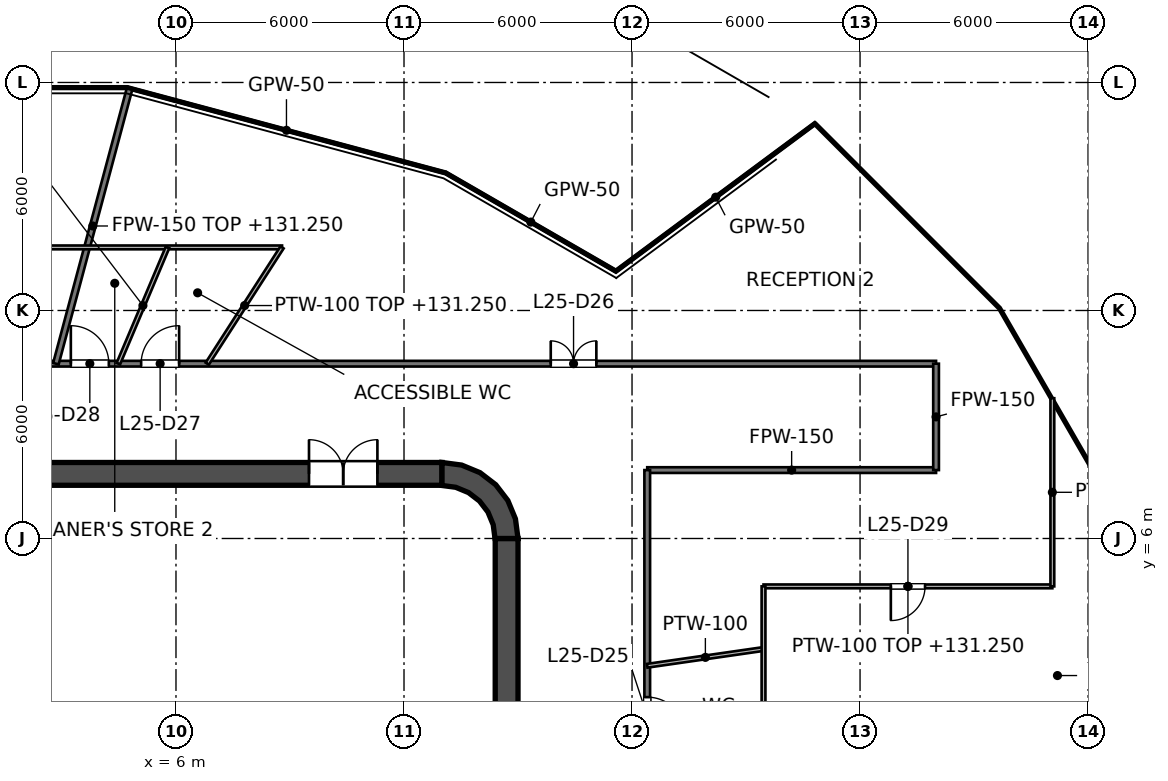
"""IFC4 building model, lengths in metres.
Left out: names, types, materials, properties, quantities, classifications, styles, units other than length and angle.
Written with IfcOpenShell. Run it as: python <this file> out.ifc"""

import sys

from ifc_helpers import new_model, si_unit, direction, frame, frame_2d, origin, place, context, subcontext, project, spatial, polyline, rectangle, outline, extrude, element, fill, save


model = new_model("IFC4")
c1 = context("Model", 3, precision=1e-05, world=origin(), true_north=direction((0.0, 1.0)))
c2 = subcontext(c1, "Body", "Model", "MODEL_VIEW")
j1 = project(units=[si_unit("LENGTHUNIT", "METRE"), si_unit("PLANEANGLEUNIT", "RADIAN")], contexts=[c1])
p1 = place(None, origin())
s1 = spatial("IfcSite", under=j1, at=p1, CompositionType="ELEMENT")
p2 = place(p1, origin())
s2 = spatial("IfcBuilding", under=s1, at=p2, CompositionType="ELEMENT")
p3 = place(p2, frame((0.0, 0.0, 127.2)))
s3 = spatial("IfcBuildingStorey", under=s2, at=p3, CompositionType="ELEMENT", Elevation=127.2)
p4 = place(p3, frame((-13.0, 7.7, 0.0), z_axis=(0.0, 0.0, 1.0), x_axis=(1.0, 0.0, 0.0)))
e1 = element("IfcWall", 1, at=p4, inside=s3, PredefinedType="SHEAR", context=c2, shape_type="SweptSolid", body=[
    extrude(rectangle(XDim=26.0, YDim=0.6, at=frame_2d((13.0, 0.0))), origin(), (0.0, 0.0, 1.0), 4.2),
])
p5 = place(p4, frame((1.7, 0.0, 0.0)))
e2 = element("IfcOpeningElement", 2, at=p5, cuts=e1, PredefinedType="OPENING", context=c2, shape_type="SweptSolid", body=[
    extrude(rectangle(XDim=1.8, YDim=2.1, at=frame_2d((0.9, 1.05))), frame((0.0, 0.3, 0.0), z_axis=(0.0, -1.0, 0.0), x_axis=(1.0, 0.0, 0.0)), (0.0, 0.0, 1.0), 0.6),
])
p6 = place(p4, frame((22.5, 0.0, 0.0)))
e3 = element("IfcOpeningElement", 3, at=p6, cuts=e1, PredefinedType="OPENING", context=c2, shape_type="SweptSolid", body=[
    extrude(rectangle(XDim=1.8, YDim=2.1, at=frame_2d((0.9, 1.05))), frame((0.0, 0.3, 0.0), z_axis=(0.0, -1.0, 0.0), x_axis=(1.0, 0.0, 0.0)), (0.0, 0.0, 1.0), 0.6),
])
p7 = place(p3, frame((14.7, -6.0, 0.0), z_axis=(0.0, 0.0, 1.0), x_axis=(0.0, 1.0, 0.0)))
e4 = element("IfcWall", 4, at=p7, inside=s3, PredefinedType="SHEAR", context=c2, shape_type="SweptSolid", body=[
    extrude(rectangle(XDim=12.0, YDim=0.6, at=frame_2d((6.0, 0.0))), origin(), (0.0, 0.0, 1.0), 4.2),
])
p8 = place(p3, origin())
e5 = element("IfcWall", 5, at=p8, inside=s3, PredefinedType="SHEAR", context=c2, shape_type="SweptSolid", body=[
    extrude(outline(polyline([(13.0, 8.0), (13.0, 7.395), (13.361, 7.347), (13.698, 7.208), (13.986, 6.986), (14.208, 6.698), (14.347, 6.361), (14.395, 6.0), (15.0, 6.0), (14.932, 6.518), (14.732, 7.0), (14.414, 7.414), (14.0, 7.732), (13.518, 7.932), (13.0, 8.0)])), origin(), (0.0, 0.0, 1.0), 4.2),
])
p9 = place(p3, frame((9.0, 4.1, 0.0), z_axis=(0.0, 0.0, 1.0), x_axis=(0.0, 1.0, 0.0)))
e6 = element("IfcWall", 6, at=p9, inside=s3, PredefinedType="SOLIDWALL", context=c2, shape_type="SweptSolid", body=[
    extrude(rectangle(XDim=2.5, YDim=0.25, at=frame_2d((1.25, 0.0))), origin(), (0.0, 0.0, 1.0), 4.05),
])
p10 = place(p9, frame((0.65, 0.0, 0.0)))
e7 = element("IfcOpeningElement", 7, at=p10, cuts=e6, PredefinedType="OPENING", context=c2, shape_type="SweptSolid", body=[
    extrude(rectangle(XDim=1.2, YDim=2.1, at=frame_2d((0.6, 1.05))), frame((0.0, 0.125, 0.0), z_axis=(0.0, -1.0, 0.0), x_axis=(1.0, 0.0, 0.0)), (0.0, 0.0, 1.0), 0.25),
])
p11 = place(p3, frame((3.15, 4.1, 0.0), z_axis=(0.0, 0.0, 1.0), x_axis=(0.0, 1.0, 0.0)))
e8 = element("IfcWall", 8, at=p11, inside=s3, PredefinedType="SOLIDWALL", context=c2, shape_type="SweptSolid", body=[
    extrude(rectangle(XDim=2.5, YDim=0.25, at=frame_2d((1.25, 0.0))), origin(), (0.0, 0.0, 1.0), 4.05),
])
p12 = place(p3, frame((-9.125, 7.0, 0.0), z_axis=(0.0, 0.0, 1.0), x_axis=(1.0, 0.0, 0.0)))
e9 = element("IfcWall", 9, at=p12, inside=s3, PredefinedType="SOLIDWALL", context=c2, shape_type="SweptSolid", body=[
    extrude(rectangle(XDim=18.25, YDim=0.8, at=frame_2d((9.125, 0.0))), origin(), (0.0, 0.0, 1.0), 4.05),
])
p13 = place(p3, frame((0.775, 3.975, 0.0), z_axis=(0.0, 0.0, 1.0), x_axis=(1.0, 0.0, 0.0)))
e10 = element("IfcWall", 10, at=p13, inside=s3, PredefinedType="SOLIDWALL", context=c2, shape_type="SweptSolid", body=[
    extrude(rectangle(XDim=8.35, YDim=0.25, at=frame_2d((4.175, 0.0))), origin(), (0.0, 0.0, 1.0), 4.05),
])
p14 = place(p3, frame((9.0, 1.65, 0.0), z_axis=(0.0, 0.0, 1.0), x_axis=(0.0, 1.0, 0.0)))
e11 = element("IfcWall", 11, at=p14, inside=s3, PredefinedType="PARTITIONING", context=c2, shape_type="SweptSolid", body=[
    extrude(rectangle(XDim=2.2, YDim=0.25, at=frame_2d((1.1, 0.0))), origin(), (0.0, 0.0, 1.0), 4.05),
])
p15 = place(p3, frame((4.4, 1.65, 0.0), z_axis=(0.0, 0.0, 1.0), x_axis=(0.0, 1.0, 0.0)))
e12 = element("IfcWall", 12, at=p15, inside=s3, PredefinedType="PARTITIONING", context=c2, shape_type="SweptSolid", body=[
    extrude(rectangle(XDim=2.2, YDim=0.1, at=frame_2d((1.1, 0.0))), origin(), (0.0, 0.0, 1.0), 4.05),
])
p16 = place(p3, frame((11.8, -7.4, 0.0), z_axis=(0.0, 0.0, 1.0), x_axis=(0.0, 1.0, 0.0)))
e13 = element("IfcWall", 13, at=p16, inside=s3, PredefinedType="SOLIDWALL", context=c2, shape_type="SweptSolid", body=[
    extrude(rectangle(XDim=14.8, YDim=0.4, at=frame_2d((7.4, 0.0))), origin(), (0.0, 0.0, 1.0), 4.05),
])
p17 = place(p16, frame((11.2, 0.0, 0.0)))
e14 = element("IfcOpeningElement", 14, at=p17, cuts=e13, PredefinedType="OPENING", context=c2, shape_type="SweptSolid", body=[
    extrude(rectangle(XDim=1.1, YDim=2.1, at=frame_2d((0.55, 1.05))), frame((0.0, 0.2, 0.0), z_axis=(0.0, -1.0, 0.0), x_axis=(1.0, 0.0, 0.0)), (0.0, 0.0, 1.0), 0.4),
])
p18 = place(p16, frame((8.3, 0.0, 0.0)))
e15 = element("IfcOpeningElement", 15, at=p18, cuts=e13, PredefinedType="OPENING", context=c2, shape_type="SweptSolid", body=[
    extrude(rectangle(XDim=1.1, YDim=2.1, at=frame_2d((0.55, 1.05))), frame((0.0, 0.2, 0.0), z_axis=(0.0, -1.0, 0.0), x_axis=(1.0, 0.0, 0.0)), (0.0, 0.0, 1.0), 0.4),
])
p19 = place(p16, frame((5.4, 0.0, 0.0)))
e16 = element("IfcOpeningElement", 16, at=p19, cuts=e13, PredefinedType="OPENING", context=c2, shape_type="SweptSolid", body=[
    extrude(rectangle(XDim=1.1, YDim=2.1, at=frame_2d((0.55, 1.05))), frame((0.0, 0.2, 0.0), z_axis=(0.0, -1.0, 0.0), x_axis=(1.0, 0.0, 0.0)), (0.0, 0.0, 1.0), 0.4),
])
p20 = place(p16, frame((13.552, 0.0, 0.0)))
e17 = element("IfcOpeningElement", 17, at=p20, cuts=e13, PredefinedType="OPENING", context=c2, shape_type="SweptSolid", body=[
    extrude(rectangle(XDim=0.9, YDim=2.1, at=frame_2d((0.45, 1.05))), frame((0.0, 0.2, 0.0), z_axis=(0.0, -1.0, 0.0), x_axis=(1.0, 0.0, 0.0)), (0.0, 0.0, 1.0), 0.4),
])
p21 = place(p16, frame((0.347, 0.0, 0.0)))
e18 = element("IfcOpeningElement", 18, at=p21, cuts=e13, PredefinedType="OPENING", context=c2, shape_type="SweptSolid", body=[
    extrude(rectangle(XDim=0.9, YDim=2.1, at=frame_2d((0.45, 1.05))), frame((0.0, 0.2, 0.0), z_axis=(0.0, -1.0, 0.0), x_axis=(1.0, 0.0, 0.0)), (0.0, 0.0, 1.0), 0.4),
])
e19 = element("IfcWall", 19, at=p8, inside=s3, PredefinedType="SOLIDWALL", context=c2, shape_type="SweptSolid", body=[
    extrude(outline(polyline([(12.0, -5.675), (12.0, -5.925), (14.15, -5.925), (14.4, -5.925), (14.4, -5.675), (14.4, -3.025), (14.4, -2.775), (14.4, -0.125), (14.4, 0.125), (14.4, 2.775), (14.4, 3.025), (14.4, 5.675), (14.4, 5.925), (14.15, 5.925), (12.0, 5.925), (12.0, 5.675), (14.15, 5.675), (14.15, 3.025), (12.0, 3.025), (12.0, 2.775), (14.15, 2.775), (14.15, 0.125), (12.0, 0.125), (12.0, -0.125), (14.15, -0.125), (14.15, -2.775), (12.0, -2.775), (12.0, -3.025), (14.15, -3.025), (14.15, -5.675), (12.0, -5.675)])), origin(), (0.0, 0.0, 1.0), 4.05),
])
p22 = place(p3, frame((18.4, 7.8, 0.0), z_axis=(0.0, 0.0, 1.0), x_axis=(1.0, 0.0, 0.0)))
e20 = element("IfcWall", 20, at=p22, inside=s3, PredefinedType="PARTITIONING", context=c2, shape_type="SweptSolid", body=[
    extrude(rectangle(XDim=7.6, YDim=0.15, at=frame_2d((3.8, 0.0))), origin(), (0.0, 0.0, 1.0), 3.195),
])
p23 = place(p3, frame((-26.0, 10.6, 0.0), z_axis=(0.0, 0.0, 1.0), x_axis=(1.0, 0.0, 0.0)))
e21 = element("IfcWall", 21, at=p23, inside=s3, PredefinedType="PARTITIONING", context=c2, shape_type="SweptSolid", body=[
    extrude(rectangle(XDim=52.0, YDim=0.15, at=frame_2d((26.0, 0.0))), origin(), (0.0, 0.0, 1.0), 3.127),
])
p24 = place(p23, frame((41.861, 0.0, 0.0)))
e22 = element("IfcOpeningElement", 22, at=p24, cuts=e21, PredefinedType="OPENING", context=c2, shape_type="SweptSolid", body=[
    extrude(rectangle(XDim=1.2, YDim=2.1, at=frame_2d((0.6, 1.05))), frame((0.0, 0.075, 0.0), z_axis=(0.0, -1.0, 0.0), x_axis=(1.0, 0.0, 0.0)), (0.0, 0.0, 1.0), 0.15),
])
p25 = place(p23, frame((31.083, 0.0, 0.0)))
e23 = element("IfcOpeningElement", 23, at=p25, cuts=e21, PredefinedType="OPENING", context=c2, shape_type="SweptSolid", body=[
    extrude(rectangle(XDim=1.0, YDim=2.1, at=frame_2d((0.5, 1.05))), frame((0.0, 0.075, 0.0), z_axis=(0.0, -1.0, 0.0), x_axis=(1.0, 0.0, 0.0)), (0.0, 0.0, 1.0), 0.15),
])
p26 = place(p23, frame((29.233, 0.0, 0.0)))
e24 = element("IfcOpeningElement", 24, at=p26, cuts=e21, PredefinedType="OPENING", context=c2, shape_type="SweptSolid", body=[
    extrude(rectangle(XDim=1.0, YDim=2.1, at=frame_2d((0.5, 1.05))), frame((0.0, 0.075, 0.0), z_axis=(0.0, -1.0, 0.0), x_axis=(1.0, 0.0, 0.0)), (0.0, 0.0, 1.0), 0.15),
])
p27 = place(p23, frame((25.5, 0.0, 0.0)))
e25 = element("IfcOpeningElement", 25, at=p27, cuts=e21, PredefinedType="OPENING", context=c2, shape_type="SweptSolid", body=[
    extrude(rectangle(XDim=1.0, YDim=2.1, at=frame_2d((0.5, 1.05))), frame((0.0, 0.075, 0.0), z_axis=(0.0, -1.0, 0.0), x_axis=(1.0, 0.0, 0.0)), (0.0, 0.0, 1.0), 0.15),
])
p28 = place(p23, frame((14.83, 0.0, 0.0)))
e26 = element("IfcOpeningElement", 26, at=p28, cuts=e21, PredefinedType="OPENING", context=c2, shape_type="SweptSolid", body=[
    extrude(rectangle(XDim=1.0, YDim=2.1, at=frame_2d((0.5, 1.05))), frame((0.0, 0.075, 0.0), z_axis=(0.0, -1.0, 0.0), x_axis=(1.0, 0.0, 0.0)), (0.0, 0.0, 1.0), 0.15),
])
p29 = place(p23, frame((3.249, 0.0, 0.0)))
e27 = element("IfcOpeningElement", 27, at=p29, cuts=e21, PredefinedType="OPENING", context=c2, shape_type="SweptSolid", body=[
    extrude(rectangle(XDim=1.0, YDim=2.1, at=frame_2d((0.5, 1.05))), frame((0.0, 0.075, 0.0), z_axis=(0.0, -1.0, 0.0), x_axis=(1.0, 0.0, 0.0)), (0.0, 0.0, 1.0), 0.15),
])
p30 = place(p3, frame((2.84, 10.6, 0.0), z_axis=(0.0, 0.0, 1.0), x_axis=(0.258833136442, 0.965922050416, 0.0)))
e28 = element("IfcWall", 28, at=p30, inside=s3, PredefinedType="PARTITIONING", context=c2, shape_type="SweptSolid", body=[
    extrude(rectangle(XDim=7.502, YDim=0.15, at=frame_2d((3.751, 0.0))), origin(), (0.0, 0.0, 1.0), 4.05),
])
p31 = place(p3, frame((26.0, 7.8, 0.0), z_axis=(0.0, 0.0, 1.0), x_axis=(0.0, 1.0, 0.0)))
e29 = element("IfcWall", 29, at=p31, inside=s3, PredefinedType="PARTITIONING", context=c2, shape_type="SweptSolid", body=[
    extrude(rectangle(XDim=2.8, YDim=0.15, at=frame_2d((1.4, 0.0))), origin(), (0.0, 0.0, 1.0), 3.195),
])
p32 = place(p3, frame((18.4, -7.8, 0.0), z_axis=(0.0, 0.0, 1.0), x_axis=(0.0, 1.0, 0.0)))
e30 = element("IfcWall", 30, at=p32, inside=s3, PredefinedType="PARTITIONING", context=c2, shape_type="SweptSolid", body=[
    extrude(rectangle(XDim=15.6, YDim=0.15, at=frame_2d((7.8, 0.0))), origin(), (0.0, 0.0, 1.0), 3.127),
])
p33 = place(p32, frame((8.625, 0.0, 0.0)))
e31 = element("IfcOpeningElement", 31, at=p33, cuts=e30, PredefinedType="OPENING", context=c2, shape_type="SweptSolid", body=[
    extrude(rectangle(XDim=1.0, YDim=2.1, at=frame_2d((0.5, 1.05))), frame((0.0, 0.075, 0.0), z_axis=(0.0, -1.0, 0.0), x_axis=(1.0, 0.0, 0.0)), (0.0, 0.0, 1.0), 0.15),
])
p34 = place(p3, frame((13.098, 15.619, 0.0), z_axis=(0.0, 0.0, 1.0), x_axis=(0.866014140959, -0.500019507279, 0.0)))
e32 = element("IfcWall", 32, at=p34, inside=s3, PredefinedType="PARTITIONING", context=c2, shape_type="SweptSolid", body=[
    extrude(rectangle(XDim=5.17, YDim=0.05, at=frame_2d((2.585, 0.0))), origin(), (0.0, 0.0, 1.0), 3.127),
])
p35 = place(p3, frame((4.716, 17.865, 0.0), z_axis=(0.0, 0.0, 1.0), x_axis=(0.965920421928, -0.258839213612, 0.0)))
e33 = element("IfcWall", 33, at=p35, inside=s3, PredefinedType="PARTITIONING", context=c2, shape_type="SweptSolid", body=[
    extrude(rectangle(XDim=8.677, YDim=0.05, at=frame_2d((4.339, 0.0))), origin(), (0.0, 0.0, 1.0), 3.127),
])
p36 = place(p3, frame((-4.716, 17.865, 0.0), z_axis=(0.0, 0.0, 1.0), x_axis=(1.0, 0.0, 0.0)))
e34 = element("IfcWall", 34, at=p36, inside=s3, PredefinedType="PARTITIONING", context=c2, shape_type="SweptSolid", body=[
    extrude(rectangle(XDim=9.432, YDim=0.05, at=frame_2d((4.716, 0.0))), origin(), (0.0, 0.0, 1.0), 3.127),
])
p37 = place(p3, frame((17.575, 13.034, 0.0), z_axis=(0.0, 0.0, 1.0), x_axis=(0.803195977764, 0.59571488256, 0.0)))
e35 = element("IfcWall", 35, at=p37, inside=s3, PredefinedType="PARTITIONING", context=c2, shape_type="SweptSolid", body=[
    extrude(rectangle(XDim=6.54, YDim=0.05, at=frame_2d((3.27, 0.0))), origin(), (0.0, 0.0, 1.0), 3.127),
])
p38 = place(p3, frame((21.46, 4.74, 0.0), z_axis=(0.0, 0.0, 1.0), x_axis=(1.0, 0.0, 0.0)))
e36 = element("IfcWall", 36, at=p38, inside=s3, PredefinedType="PARTITIONING", context=c2, shape_type="SweptSolid", body=[
    extrude(rectangle(XDim=7.6, YDim=0.1, at=frame_2d((3.8, 0.0))), origin(), (0.0, 0.0, 1.0), 4.05),
])
p39 = place(p38, frame((3.35, 0.0, 0.0)))
e37 = element("IfcOpeningElement", 37, at=p39, cuts=e36, PredefinedType="OPENING", context=c2, shape_type="SweptSolid", body=[
    extrude(rectangle(XDim=0.9, YDim=2.1, at=frame_2d((0.45, 1.05))), frame((0.0, 0.05, 0.0), z_axis=(0.0, -1.0, 0.0), x_axis=(1.0, 0.0, 0.0)), (0.0, 0.0, 1.0), 0.1),
])
p40 = place(p3, frame((-23.66, 13.66, 0.0), z_axis=(0.0, 0.0, 1.0), x_axis=(1.0, 0.0, 0.0)))
e38 = element("IfcWall", 38, at=p40, inside=s3, PredefinedType="PARTITIONING", context=c2, shape_type="SweptSolid", body=[
    extrude(rectangle(XDim=32.451, YDim=0.1, at=frame_2d((16.226, 0.0))), origin(), (0.0, 0.0, 1.0), 3.127),
])
p41 = place(p40, frame((9.55, 0.0, 0.0)))
e39 = element("IfcOpeningElement", 39, at=p41, cuts=e38, PredefinedType="OPENING", context=c2, shape_type="SweptSolid", body=[
    extrude(rectangle(XDim=0.9, YDim=2.1, at=frame_2d((0.45, 1.05))), frame((0.0, 0.05, 0.0), z_axis=(0.0, -1.0, 0.0), x_axis=(1.0, 0.0, 0.0)), (0.0, 0.0, 1.0), 0.1),
])
p42 = place(p3, frame((18.4, 2.651, 0.0), z_axis=(0.0, 0.0, 1.0), x_axis=(0.989767054152, 0.142692601472, 0.0)))
e40 = element("IfcWall", 40, at=p42, inside=s3, PredefinedType="PARTITIONING", context=c2, shape_type="SweptSolid", body=[
    extrude(rectangle(XDim=3.092, YDim=0.1, at=frame_2d((1.546, 0.0))), origin(), (0.0, 0.0, 1.0), 3.127),
])
p43 = place(p3, frame((6.822, 10.6, 0.0), z_axis=(0.0, 0.0, 1.0), x_axis=(0.541140741439, 0.840932041222, 0.0)))
e41 = element("IfcWall", 41, at=p43, inside=s3, PredefinedType="PARTITIONING", context=c2, shape_type="SweptSolid", body=[
    extrude(rectangle(XDim=3.639, YDim=0.1, at=frame_2d((1.819, 0.0))), origin(), (0.0, 0.0, 1.0), 4.05),
])
p44 = place(p3, frame((4.483, 10.6, 0.0), z_axis=(0.0, 0.0, 1.0), x_axis=(0.389551289035, 0.921004773718, 0.0)))
e42 = element("IfcWall", 42, at=p44, inside=s3, PredefinedType="PARTITIONING", context=c2, shape_type="SweptSolid", body=[
    extrude(rectangle(XDim=3.322, YDim=0.1, at=frame_2d((1.661, 0.0))), origin(), (0.0, 0.0, 1.0), 4.05),
])
p45 = place(p3, frame((29.06, 4.74, 0.0), z_axis=(0.0, 0.0, 1.0), x_axis=(0.0, 1.0, 0.0)))
e43 = element("IfcWall", 43, at=p45, inside=s3, PredefinedType="PARTITIONING", context=c2, shape_type="SweptSolid", body=[
    extrude(rectangle(XDim=4.951, YDim=0.1, at=frame_2d((2.476, 0.0))), origin(), (0.0, 0.0, 1.0), 3.127),
])
p46 = place(p3, frame((21.46, -4.74, 0.0), z_axis=(0.0, 0.0, 1.0), x_axis=(0.0, 1.0, 0.0)))
e44 = element("IfcWall", 44, at=p46, inside=s3, PredefinedType="PARTITIONING", context=c2, shape_type="SweptSolid", body=[
    extrude(rectangle(XDim=9.48, YDim=0.1, at=frame_2d((4.74, 0.0))), origin(), (0.0, 0.0, 1.0), 3.127),
])
p47 = place(p17, origin())
e45 = element("IfcDoor", 45, at=p47, inside=s3, OperationType="DOUBLE_DOOR_SLIDING", PredefinedType="DOOR", context=c2, shape_type="SweptSolid", body=[
    extrude(rectangle(XDim=1.1, YDim=2.1, at=frame_2d((0.55, 1.05))), frame((0.0, 0.025, 0.0), z_axis=(0.0, -1.0, 0.0), x_axis=(1.0, 0.0, 0.0)), (0.0, 0.0, 1.0), 0.05),
])
fill(e14, e45)
p48 = place(p18, origin())
e46 = element("IfcDoor", 46, at=p48, inside=s3, OperationType="DOUBLE_DOOR_SLIDING", PredefinedType="DOOR", context=c2, shape_type="SweptSolid", body=[
    extrude(rectangle(XDim=1.1, YDim=2.1, at=frame_2d((0.55, 1.05))), frame((0.0, 0.025, 0.0), z_axis=(0.0, -1.0, 0.0), x_axis=(1.0, 0.0, 0.0)), (0.0, 0.0, 1.0), 0.05),
])
fill(e15, e46)
p49 = place(p10, origin())
e47 = element("IfcDoor", 47, at=p49, inside=s3, OperationType="SINGLE_SWING_LEFT", PredefinedType="DOOR", context=c2, shape_type="SweptSolid", body=[
    extrude(rectangle(XDim=1.2, YDim=2.1, at=frame_2d((0.6, 1.05))), frame((0.0, 0.025, 0.0), z_axis=(0.0, -1.0, 0.0), x_axis=(1.0, 0.0, 0.0)), (0.0, 0.0, 1.0), 0.05),
])
fill(e7, e47)
p50 = place(p20, origin())
e48 = element("IfcDoor", 48, at=p50, inside=s3, OperationType="SINGLE_SWING_RIGHT", PredefinedType="DOOR", context=c2, shape_type="SweptSolid", body=[
    extrude(rectangle(XDim=0.9, YDim=2.1, at=frame_2d((0.45, 1.05))), frame((0.0, 0.025, 0.0), z_axis=(0.0, -1.0, 0.0), x_axis=(1.0, 0.0, 0.0)), (0.0, 0.0, 1.0), 0.05),
])
fill(e17, e48)
p51 = place(p6, origin())
e49 = element("IfcDoor", 49, at=p51, inside=s3, OperationType="DOUBLE_DOOR_SINGLE_SWING", PredefinedType="DOOR", context=c2, shape_type="SweptSolid", body=[
    extrude(rectangle(XDim=1.8, YDim=2.1, at=frame_2d((0.9, 1.05))), frame((0.0, 0.025, 0.0), z_axis=(0.0, -1.0, 0.0), x_axis=(1.0, 0.0, 0.0)), (0.0, 0.0, 1.0), 0.05),
])
fill(e3, e49)
p52 = place(p33, origin())
e50 = element("IfcDoor", 50, at=p52, inside=s3, OperationType="SINGLE_SWING_LEFT", PredefinedType="DOOR", context=c2, shape_type="SweptSolid", body=[
    extrude(rectangle(XDim=1.0, YDim=2.1, at=frame_2d((0.5, 1.05))), frame((0.0, 0.025, 0.0), z_axis=(0.0, -1.0, 0.0), x_axis=(1.0, 0.0, 0.0)), (0.0, 0.0, 1.0), 0.05),
])
fill(e31, e50)
p53 = place(p24, origin())
e51 = element("IfcDoor", 51, at=p53, inside=s3, OperationType="DOUBLE_DOOR_SINGLE_SWING", PredefinedType="DOOR", context=c2, shape_type="SweptSolid", body=[
    extrude(rectangle(XDim=1.2, YDim=2.1, at=frame_2d((0.6, 1.05))), frame((0.0, 0.025, 0.0), z_axis=(0.0, -1.0, 0.0), x_axis=(1.0, 0.0, 0.0)), (0.0, 0.0, 1.0), 0.05),
])
fill(e22, e51)
p54 = place(p25, origin())
e52 = element("IfcDoor", 52, at=p54, inside=s3, OperationType="SINGLE_SWING_RIGHT", PredefinedType="DOOR", context=c2, shape_type="SweptSolid", body=[
    extrude(rectangle(XDim=1.0, YDim=2.1, at=frame_2d((0.5, 1.05))), frame((0.0, 0.025, 0.0), z_axis=(0.0, -1.0, 0.0), x_axis=(1.0, 0.0, 0.0)), (0.0, 0.0, 1.0), 0.05),
])
fill(e23, e52)
p55 = place(p26, origin())
e53 = element("IfcDoor", 53, at=p55, inside=s3, OperationType="SINGLE_SWING_LEFT", PredefinedType="DOOR", context=c2, shape_type="SweptSolid", body=[
    extrude(rectangle(XDim=1.0, YDim=2.1, at=frame_2d((0.5, 1.05))), frame((0.0, 0.025, 0.0), z_axis=(0.0, -1.0, 0.0), x_axis=(1.0, 0.0, 0.0)), (0.0, 0.0, 1.0), 0.05),
])
fill(e24, e53)
p56 = place(p39, origin())
e54 = element("IfcDoor", 54, at=p56, inside=s3, OperationType="SINGLE_SWING_LEFT", PredefinedType="DOOR", context=c2, shape_type="SweptSolid", body=[
    extrude(rectangle(XDim=0.9, YDim=2.1, at=frame_2d((0.45, 1.05))), frame((0.0, 0.025, 0.0), z_axis=(0.0, -1.0, 0.0), x_axis=(1.0, 0.0, 0.0)), (0.0, 0.0, 1.0), 0.05),
])
fill(e37, e54)
save(model, sys.argv[1])
